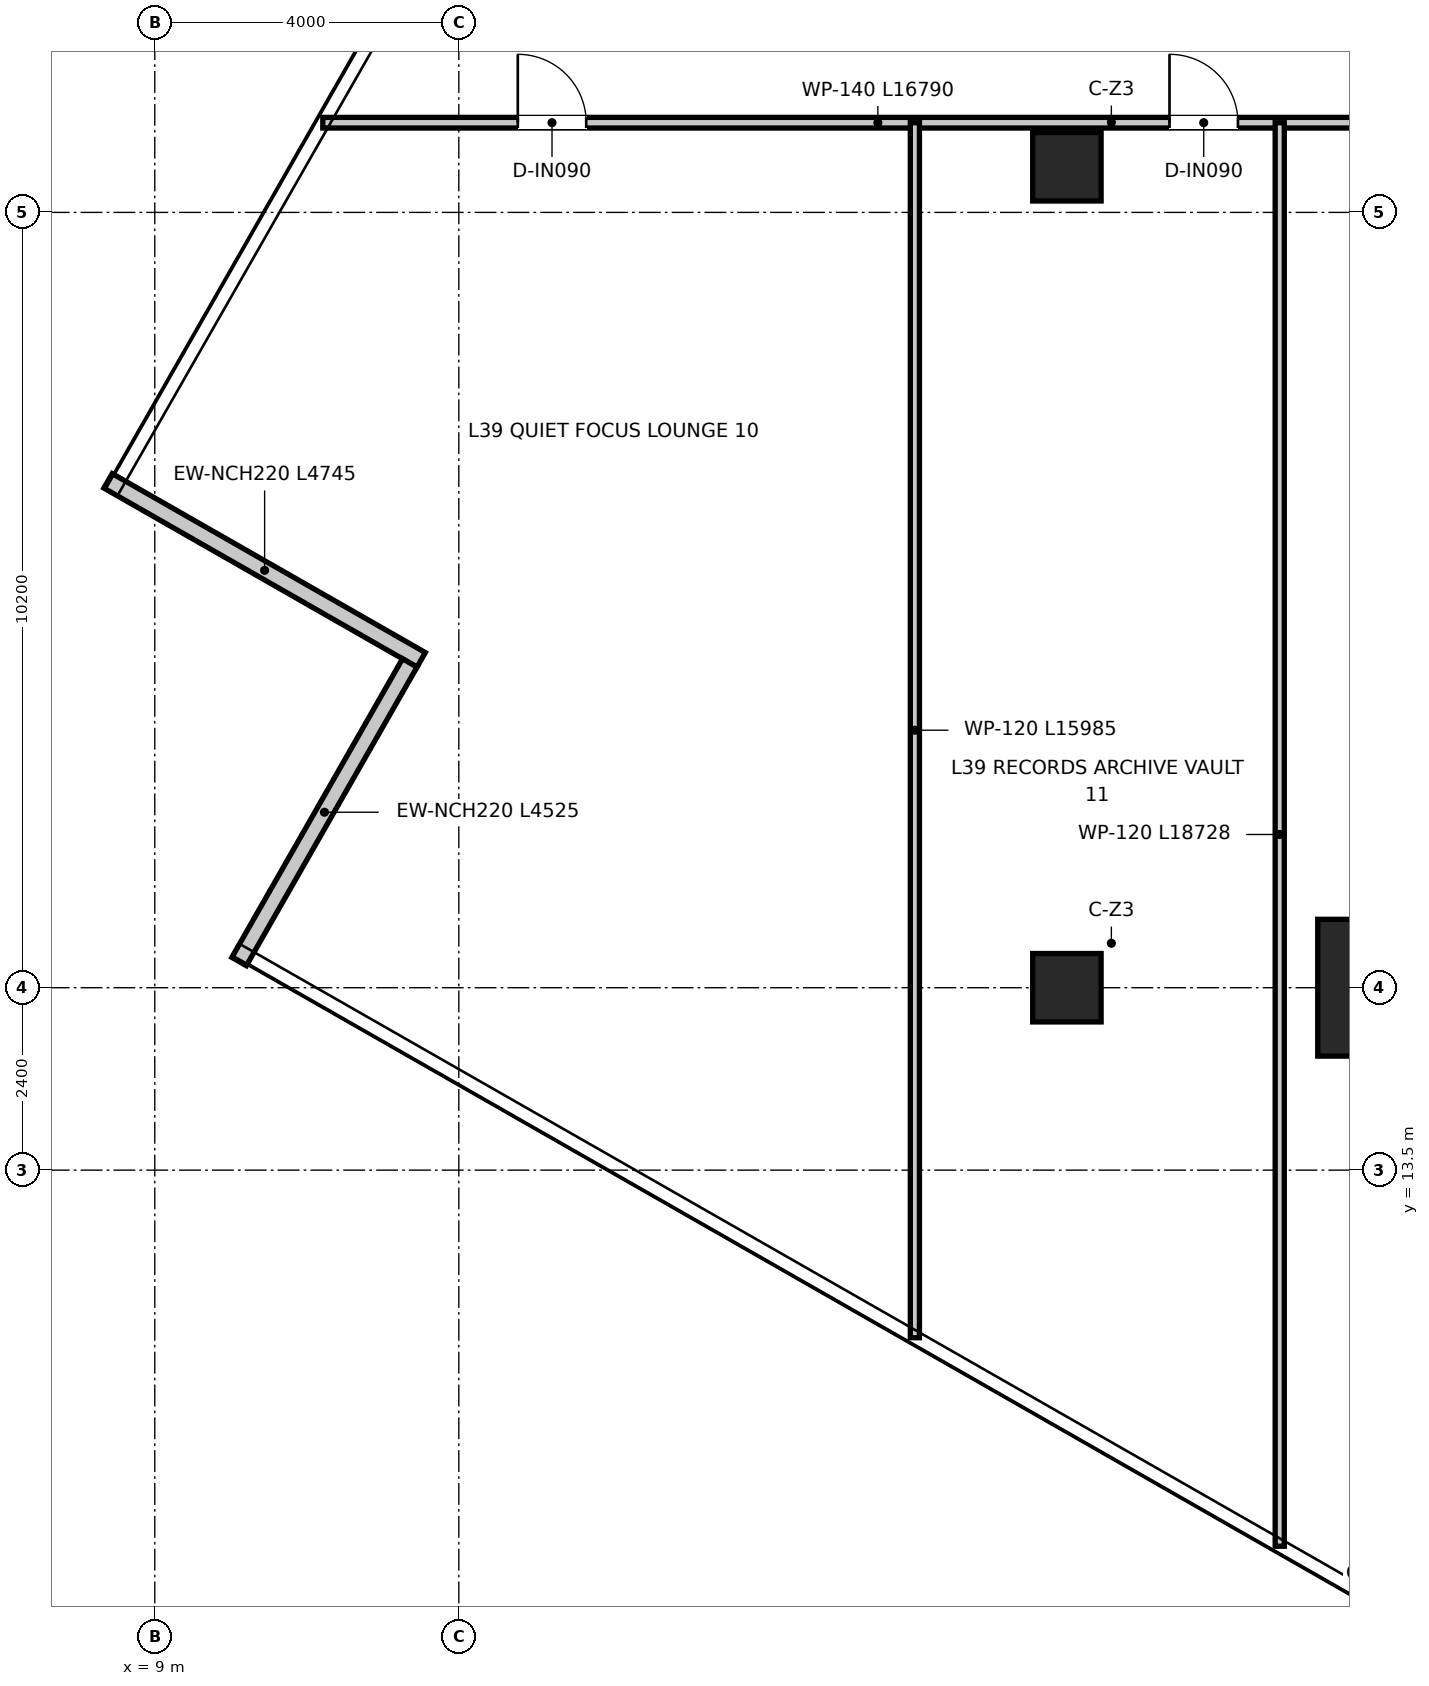
"""IFC4 building model, lengths in metres.
Left out: names, types, materials, properties, quantities, classifications, styles, units other than length and angle.
Written with IfcOpenShell. Run it as: python <this file> out.ifc"""

import sys

from ifc_helpers import new_model, si_unit, direction, frame, frame_2d, origin, origin_2d, place, context, subcontext, project, spatial, rectangle, extrude, source, transform, mapped, element, fill, save


model = new_model("IFC4")
c1 = context("Model", 3, precision=1e-05, world=origin(), true_north=direction((0.0, 1.0)))
c2 = subcontext(c1, "Body", "Model", "MODEL_VIEW")
j1 = project(units=[si_unit("LENGTHUNIT", "METRE"), si_unit("PLANEANGLEUNIT", "RADIAN")], contexts=[c1])
p1 = place(None, origin())
s1 = spatial("IfcSite", under=j1, at=p1, CompositionType="ELEMENT")
p2 = place(p1, origin())
s2 = spatial("IfcBuilding", under=s1, at=p2, CompositionType="ELEMENT")
p3 = place(p2, frame((0.0, 0.0, 162.0)))
s3 = spatial("IfcBuildingStorey", under=s2, at=p3, CompositionType="ELEMENT", Elevation=162.0)
m1 = source(origin(), c2, "Body", "SweptSolid", [
    extrude(rectangle(XDim=1.8, YDim=1.8, at=origin_2d()), origin(), (0.0, 0.0, 1.0), 3.95),
])
p4 = place(p3, frame((25.2, 15.9, 0.0), z_axis=(0.0, 0.0, 1.0), x_axis=(1.0, 0.0, 0.0)))
e1 = element("IfcColumn", 1, at=p4, inside=s3, PredefinedType="USERDEFINED", context=c2, shape_type="MappedRepresentation", body=[
    mapped(m1, transform((0.0, 0.0, 0.0), x_axis=(1.0, 0.0, 0.0), y_axis=(0.0, 1.0, 0.0), z_axis=(0.0, 0.0, 1.0), scale=1.0)),
])
m2 = source(origin(), c2, "Body", "SweptSolid", [
    extrude(rectangle(XDim=0.9, YDim=0.9, at=origin_2d()), origin(), (0.0, 0.0, 1.0), 3.95),
])
for number, where, z_axis, x_axis in (
    (2, (21.0, 15.9, 0.0), (0.0, 0.0, 1.0), (1.0, 0.0, 0.0)),
    (3, (21.0, 26.7, 0.0), (0.0, 0.0, 1.0), (1.0, 0.0, 0.0)),
):
    element("IfcColumn", number, at=place(p3, frame(where, z_axis=z_axis, x_axis=x_axis)), inside=s3, PredefinedType="COLUMN", context=c2, shape_type="MappedRepresentation", body=[
        mapped(m2, transform((0.0, 0.0, 0.0), x_axis=(1.0, 0.0, 0.0), y_axis=(0.0, 1.0, 0.0), z_axis=(0.0, 0.0, 1.0), scale=1.0)),
    ])
p5 = place(p3, frame((8.385, 22.568, 0.0), z_axis=(0.0, 0.0, 1.0), x_axis=(0.868192474665, -0.496227595903, 0.0)))
e4 = element("IfcWall", 4, at=p5, inside=s3, PredefinedType="ELEMENTEDWALL", context=c2, shape_type="SweptSolid", body=[
    extrude(rectangle(XDim=4.745, YDim=0.22, at=frame_2d((2.373, 0.0))), origin(), (0.0, 0.0, 1.0), 3.67),
])
p6 = place(p3, frame((12.355, 20.173, 0.0), z_axis=(0.0, 0.0, 1.0), x_axis=(-0.496226094278, -0.868193332938, 0.0)))
e5 = element("IfcWall", 5, at=p6, inside=s3, PredefinedType="ELEMENTEDWALL", context=c2, shape_type="SweptSolid", body=[
    extrude(rectangle(XDim=4.525, YDim=0.22, at=frame_2d((2.262, 0.0))), origin(), (0.0, 0.0, 1.0), 3.67),
])
p7 = place(p3, frame((11.21, 27.28, 0.0), z_axis=(0.0, 0.0, 1.0), x_axis=(1.0, 0.0, 0.0)))
e6 = element("IfcWall", 6, at=p7, inside=s3, PredefinedType="PARTITIONING", context=c2, shape_type="SweptSolid", body=[
    extrude(rectangle(XDim=16.79, YDim=0.14, at=frame_2d((8.395, 0.0))), origin(), (0.0, 0.0, 1.0), 3.03),
])
p8 = place(p7, frame((2.565, 0.0, 0.0)))
e7 = element("IfcOpeningElement", 7, at=p8, cuts=e6, PredefinedType="OPENING", context=c2, shape_type="SweptSolid", body=[
    extrude(rectangle(XDim=0.9, YDim=2.1, at=frame_2d((0.45, 1.05))), frame((0.0, 0.08, 0.0), z_axis=(0.0, -1.0, 0.0), x_axis=(1.0, 0.0, 0.0)), (0.0, 0.0, 1.0), 0.16),
])
p9 = place(p7, frame((11.139, 0.0, 0.0)))
e8 = element("IfcOpeningElement", 8, at=p9, cuts=e6, PredefinedType="OPENING", context=c2, shape_type="SweptSolid", body=[
    extrude(rectangle(XDim=0.9, YDim=2.1, at=frame_2d((0.45, 1.05))), frame((0.0, 0.08, 0.0), z_axis=(0.0, -1.0, 0.0), x_axis=(1.0, 0.0, 0.0)), (0.0, 0.0, 1.0), 0.16),
])
p10 = place(p7, frame((13.939, 0.0, 0.0)))
e9 = element("IfcOpeningElement", 9, at=p10, cuts=e6, PredefinedType="OPENING", context=c2, shape_type="SweptSolid", body=[
    extrude(rectangle(XDim=0.9, YDim=2.1, at=frame_2d((0.45, 1.05))), frame((0.0, 0.08, 0.0), z_axis=(0.0, -1.0, 0.0), x_axis=(1.0, 0.0, 0.0)), (0.0, 0.0, 1.0), 0.16),
])
p11 = place(p3, frame((19.0, 11.295, 0.0), z_axis=(0.0, 0.0, 1.0), x_axis=(0.0, 1.0, 0.0)))
e10 = element("IfcWall", 10, at=p11, inside=s3, PredefinedType="PARTITIONING", context=c2, shape_type="SweptSolid", body=[
    extrude(rectangle(XDim=15.985, YDim=0.12, at=frame_2d((7.992, 0.0))), origin(), (0.0, 0.0, 1.0), 3.67),
])
p12 = place(p3, frame((23.8, 8.552, 0.0), z_axis=(0.0, 0.0, 1.0), x_axis=(0.0, 1.0, 0.0)))
e11 = element("IfcWall", 11, at=p12, inside=s3, PredefinedType="PARTITIONING", context=c2, shape_type="SweptSolid", body=[
    extrude(rectangle(XDim=18.728, YDim=0.12, at=frame_2d((9.364, 0.0))), origin(), (0.0, 0.0, 1.0), 3.08),
])
p13 = place(p8, origin())
e12 = element("IfcDoor", 12, at=p13, inside=s3, OperationType="SINGLE_SWING_LEFT", PredefinedType="DOOR", context=c2, shape_type="SweptSolid", body=[
    extrude(rectangle(XDim=0.9, YDim=2.1, at=frame_2d((0.45, 1.05))), frame((0.0, 0.025, 0.0), z_axis=(0.0, -1.0, 0.0), x_axis=(1.0, 0.0, 0.0)), (0.0, 0.0, 1.0), 0.05),
])
fill(e7, e12)
p14 = place(p9, origin())
e13 = element("IfcDoor", 13, at=p14, inside=s3, OperationType="SINGLE_SWING_LEFT", PredefinedType="DOOR", context=c2, shape_type="SweptSolid", body=[
    extrude(rectangle(XDim=0.9, YDim=2.1, at=frame_2d((0.45, 1.05))), frame((0.0, 0.025, 0.0), z_axis=(0.0, -1.0, 0.0), x_axis=(1.0, 0.0, 0.0)), (0.0, 0.0, 1.0), 0.05),
])
fill(e8, e13)
save(model, sys.argv[1])
